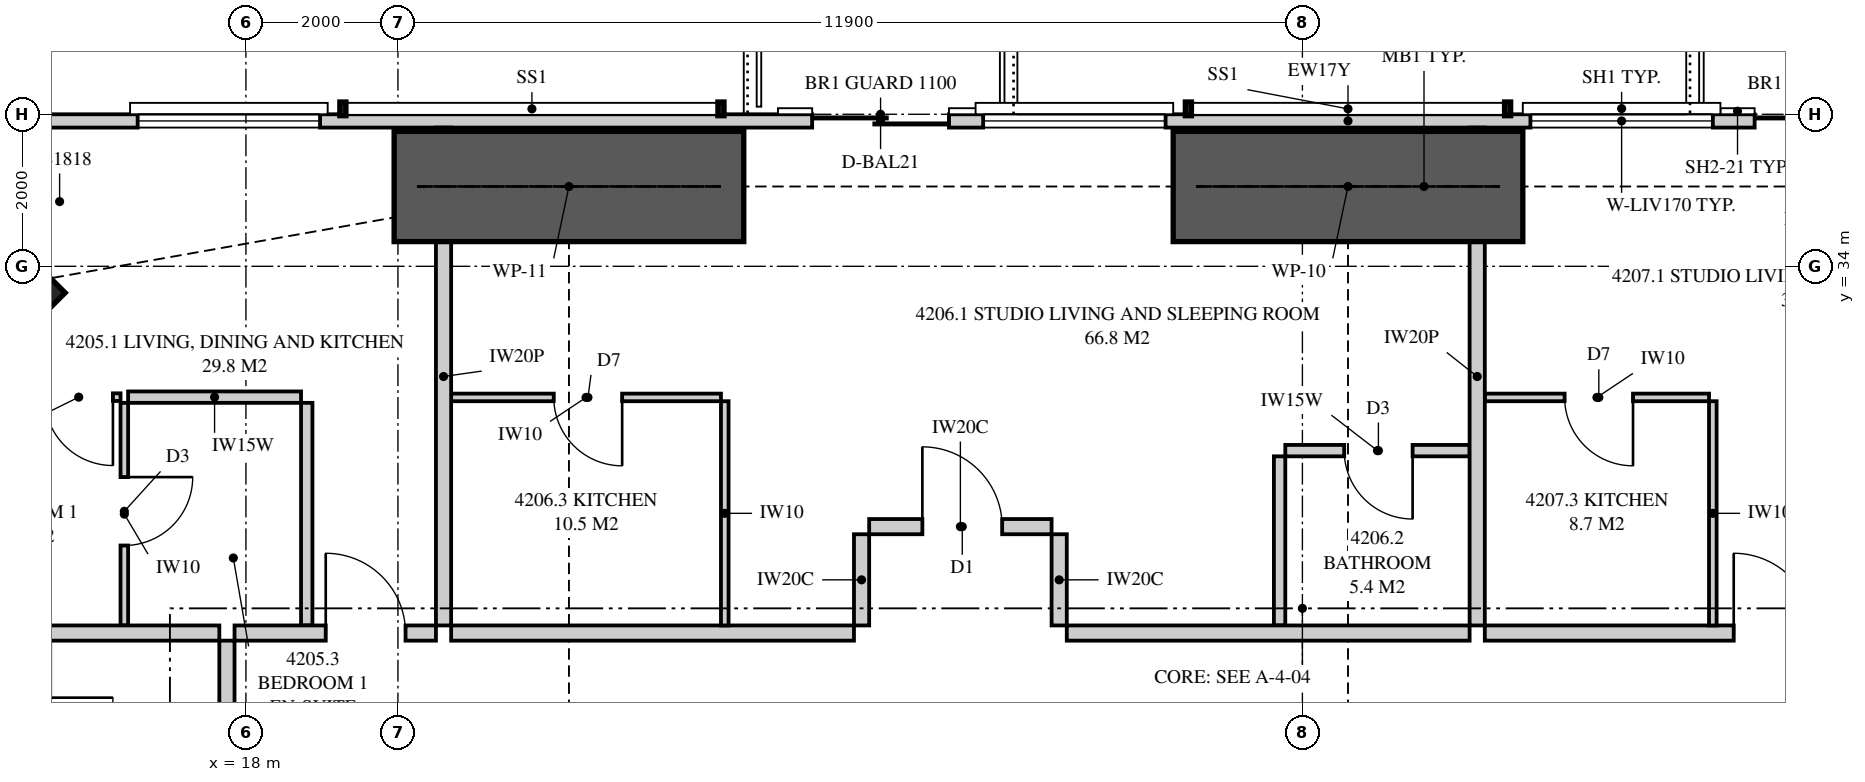
"""IFC4 building model, lengths in metres.
Left out: names, types, materials, properties, quantities, classifications, styles, units other than length and angle.
Written with IfcOpenShell. Run it as: python <this file> out.ifc"""

import sys

from ifc_helpers import new_model, si_unit, direction, frame, frame_2d, origin, origin_2d, place, context, subcontext, project, spatial, polyline, rectangle, hollow_rectangle, outline, extrude, element, fill, save


model = new_model("IFC4")
c1 = context("Model", 3, precision=1e-05, world=origin(), true_north=direction((0.0, 1.0)))
c2 = subcontext(c1, "Body", "Model", "MODEL_VIEW")
j1 = project(units=[si_unit("LENGTHUNIT", "METRE"), si_unit("PLANEANGLEUNIT", "RADIAN")], contexts=[c1])
p1 = place(None, origin())
s1 = spatial("IfcSite", under=j1, at=p1, CompositionType="ELEMENT")
p2 = place(p1, origin())
s2 = spatial("IfcBuilding", under=s1, at=p2, CompositionType="ELEMENT")
p3 = place(p2, frame((0.0, 0.0, 157.7)))
s3 = spatial("IfcBuildingStorey", under=s2, at=p3, CompositionType="ELEMENT", Elevation=157.7)
p4 = place(p3, frame((14.348, 33.652, 0.0), z_axis=(0.0, 0.0, 1.0), x_axis=(0.707106781187, -0.707106781187, 0.0)))
e1 = element("IfcColumn", 1, at=p4, inside=s3, PredefinedType="COLUMN", context=c2, shape_type="SweptSolid", body=[
    extrude(hollow_rectangle(XDim=1.8, YDim=1.8, WallThickness=0.125, at=origin_2d()), origin(), (0.0, 0.0, 1.0), 3.35),
])
p5 = place(p3, frame((49.949, 35.913, 0.0), z_axis=(0.0, 0.0, 1.0), x_axis=(-1.0, 0.0, 0.0)))
e2 = element("IfcWall", 2, at=p5, inside=s3, PredefinedType="SOLIDWALL", context=c2, shape_type="SweptSolid", body=[
    extrude(outline(polyline([(0.0, 0.0), (34.897, 0.0), (34.897, 3.11), (27.91, 3.11), (27.91, 2.15), (27.836, 2.15), (27.836, 3.11), (27.699, 3.11), (27.699, 2.15), (7.199, 2.15), (7.199, 3.11), (7.062, 3.11), (7.062, 2.15), (6.987, 2.15), (6.987, 3.11), (0.0, 3.11), (0.0, 0.0)])), frame((0.0, 0.087, 0.0), z_axis=(0.0, -1.0, 0.0), x_axis=(1.0, 0.0, 0.0)), (0.0, 0.0, 1.0), 0.175),
])
p6 = place(p5, frame((2.389, 0.0, 0.4)))
e3 = element("IfcOpeningElement", 3, at=p6, cuts=e2, PredefinedType="OPENING", context=c2, shape_type="SweptSolid", body=[
    extrude(rectangle(XDim=2.4, YDim=1.7, at=frame_2d((1.2, 0.85))), frame((0.0, 0.097, 0.0), z_axis=(0.0, -1.0, 0.0), x_axis=(1.0, 0.0, 0.0)), (0.0, 0.0, 1.0), 0.195),
])
p7 = place(p5, frame((10.299, 0.0, 0.0)))
e4 = element("IfcOpeningElement", 4, at=p7, cuts=e2, PredefinedType="OPENING", context=c2, shape_type="SweptSolid", body=[
    extrude(rectangle(XDim=1.8, YDim=2.1, at=frame_2d((0.9, 1.05))), frame((0.0, 0.097, 0.0), z_axis=(0.0, -1.0, 0.0), x_axis=(1.0, 0.0, 0.0)), (0.0, 0.0, 1.0), 0.195),
])
p8 = place(p5, frame((12.649, 0.0, 0.4)))
e5 = element("IfcOpeningElement", 5, at=p8, cuts=e2, PredefinedType="OPENING", context=c2, shape_type="SweptSolid", body=[
    extrude(rectangle(XDim=2.4, YDim=1.7, at=frame_2d((1.2, 0.85))), frame((0.0, 0.097, 0.0), z_axis=(0.0, -1.0, 0.0), x_axis=(1.0, 0.0, 0.0)), (0.0, 0.0, 1.0), 0.195),
])
p9 = place(p5, frame((22.699, 0.0, 0.0)))
e6 = element("IfcOpeningElement", 6, at=p9, cuts=e2, PredefinedType="OPENING", context=c2, shape_type="SweptSolid", body=[
    extrude(rectangle(XDim=1.8, YDim=2.1, at=frame_2d((0.9, 1.05))), frame((0.0, 0.097, 0.0), z_axis=(0.0, -1.0, 0.0), x_axis=(1.0, 0.0, 0.0)), (0.0, 0.0, 1.0), 0.195),
])
p10 = place(p5, frame((19.849, 0.0, 0.4)))
e7 = element("IfcOpeningElement", 7, at=p10, cuts=e2, PredefinedType="OPENING", context=c2, shape_type="SweptSolid", body=[
    extrude(rectangle(XDim=2.4, YDim=1.7, at=frame_2d((1.2, 0.85))), frame((0.0, 0.097, 0.0), z_axis=(0.0, -1.0, 0.0), x_axis=(1.0, 0.0, 0.0)), (0.0, 0.0, 1.0), 0.195),
])
p11 = place(p5, frame((30.973, 0.0, 0.4)))
e8 = element("IfcOpeningElement", 8, at=p11, cuts=e2, PredefinedType="OPENING", context=c2, shape_type="SweptSolid", body=[
    extrude(rectangle(XDim=2.4, YDim=1.7, at=frame_2d((1.2, 0.85))), frame((0.0, 0.097, 0.0), z_axis=(0.0, -1.0, 0.0), x_axis=(1.0, 0.0, 0.0)), (0.0, 0.0, 1.0), 0.195),
])
p12 = place(p3, frame((20.6, 35.825, 0.0), z_axis=(0.0, 0.0, 1.0), x_axis=(0.0, -1.0, 0.0)))
e9 = element("IfcWall", 9, at=p12, inside=s3, PredefinedType="PARTITIONING", context=c2, shape_type="SweptSolid", body=[
    extrude(outline(polyline([(0.143, 3.11), (0.0, 3.11), (0.0, 0.0), (0.529, 0.0), (0.529, 0.165), (1.021, 0.165), (1.021, 0.0), (6.55, 0.0), (6.55, 3.11), (1.991, 3.11), (1.991, 2.15), (1.021, 2.15), (1.021, 1.985), (0.529, 1.985), (0.529, 2.15), (0.143, 2.15), (0.143, 3.11)])), frame((0.0, 0.1, 0.0), z_axis=(0.0, -1.0, 0.0), x_axis=(1.0, 0.0, 0.0)), (0.0, 0.0, 1.0), 0.2),
])
p13 = place(p3, frame((17.85, 29.175, 0.0), z_axis=(0.0, 0.0, 1.0), x_axis=(1.0, 0.0, 0.0)))
e10 = element("IfcWall", 10, at=p13, inside=s3, PredefinedType="PARTITIONING", context=c2, shape_type="SweptSolid", body=[
    extrude(rectangle(XDim=2.65, YDim=0.2, at=frame_2d((1.325, 0.0))), origin(), (0.0, 0.0, 1.0), 3.11),
])
p14 = place(p13, frame((1.2, 0.0, 0.0)))
e11 = element("IfcOpeningElement", 11, at=p14, cuts=e10, PredefinedType="OPENING", context=c2, shape_type="SweptSolid", body=[
    extrude(rectangle(XDim=1.05, YDim=2.2, at=frame_2d((0.525, 1.1))), frame((0.0, 0.11, 0.0), z_axis=(0.0, -1.0, 0.0), x_axis=(1.0, 0.0, 0.0)), (0.0, 0.0, 1.0), 0.22),
])
p15 = place(p3, frame((16.4, 32.204, 0.0), z_axis=(0.0, 0.0, 1.0), x_axis=(0.0, -1.0, 0.0)))
e12 = element("IfcWall", 12, at=p15, inside=s3, PredefinedType="PARTITIONING", context=c2, shape_type="SweptSolid", body=[
    extrude(rectangle(XDim=2.929, YDim=0.1, at=frame_2d((1.464, 0.0))), origin(), (0.0, 0.0, 1.0), 3.11),
])
p16 = place(p15, frame((0.977, 0.0, 0.0)))
e13 = element("IfcOpeningElement", 13, at=p16, cuts=e12, PredefinedType="OPENING", context=c2, shape_type="SweptSolid", body=[
    extrude(rectangle(XDim=0.9, YDim=2.1, at=frame_2d((0.45, 1.05))), frame((0.0, 0.06, 0.0), z_axis=(0.0, -1.0, 0.0), x_axis=(1.0, 0.0, 0.0)), (0.0, 0.0, 1.0), 0.12),
])
p17 = place(p3, frame((16.35, 32.279, 0.0), z_axis=(0.0, 0.0, 1.0), x_axis=(-1.0, 0.0, 0.0)))
e14 = element("IfcWall", 14, at=p17, inside=s3, PredefinedType="PARTITIONING", context=c2, shape_type="SweptSolid", body=[
    extrude(outline(polyline([(0.0, 0.0), (4.35, 0.0), (4.35, 3.11), (3.094, 3.11), (3.094, 2.15), (1.352, 2.15), (1.352, 3.11), (0.0, 3.11), (0.0, 0.0)])), frame((0.0, 0.05, 0.0), z_axis=(0.0, -1.0, 0.0), x_axis=(1.0, 0.0, 0.0)), (0.0, 0.0, 1.0), 0.1),
])
p18 = place(p17, frame((0.1, 0.0, 0.0)))
e15 = element("IfcOpeningElement", 15, at=p18, cuts=e14, PredefinedType="OPENING", context=c2, shape_type="SweptSolid", body=[
    extrude(rectangle(XDim=0.9, YDim=2.1, at=frame_2d((0.45, 1.05))), frame((0.0, 0.06, 0.0), z_axis=(0.0, -1.0, 0.0), x_axis=(1.0, 0.0, 0.0)), (0.0, 0.0, 1.0), 0.12),
])
p19 = place(p3, frame((18.725, 32.279, 0.0), z_axis=(0.0, 0.0, 1.0), x_axis=(-1.0, 0.0, 0.0)))
e16 = element("IfcWall", 16, at=p19, inside=s3, PredefinedType="PLUMBINGWALL", context=c2, shape_type="SweptSolid", body=[
    extrude(rectangle(XDim=2.275, YDim=0.15, at=frame_2d((1.138, 0.0))), origin(), (0.0, 0.0, 1.0), 3.11),
])
p20 = place(p3, frame((18.8, 32.204, 0.0), z_axis=(0.0, 0.0, 1.0), x_axis=(0.0, -1.0, 0.0)))
e17 = element("IfcWall", 17, at=p20, inside=s3, PredefinedType="PLUMBINGWALL", context=c2, shape_type="SweptSolid", body=[
    extrude(rectangle(XDim=2.929, YDim=0.15, at=frame_2d((1.464, 0.0))), origin(), (0.0, 0.0, 1.0), 3.11),
])
p21 = place(p3, frame((34.2, 35.825, 0.0), z_axis=(0.0, 0.0, 1.0), x_axis=(0.0, -1.0, 0.0)))
e18 = element("IfcWall", 18, at=p21, inside=s3, PredefinedType="PARTITIONING", context=c2, shape_type="SweptSolid", body=[
    extrude(outline(polyline([(0.529, 2.15), (0.0, 2.15), (0.0, 0.0), (0.529, 0.0), (0.529, 0.123), (1.021, 0.123), (1.021, 0.0), (6.55, 0.0), (6.55, 3.11), (1.685, 3.11), (1.685, 2.15), (1.021, 2.15), (1.021, 2.027), (0.529, 2.027), (0.529, 2.15)])), frame((0.0, 0.1, 0.0), z_axis=(0.0, -1.0, 0.0), x_axis=(1.0, 0.0, 0.0)), (0.0, 0.0, 1.0), 0.2),
])
p22 = place(p3, frame((20.7, 29.175, 0.0), z_axis=(0.0, 0.0, 1.0), x_axis=(1.0, 0.0, 0.0)))
e19 = element("IfcWall", 19, at=p22, inside=s3, PredefinedType="PARTITIONING", context=c2, shape_type="SweptSolid", body=[
    extrude(outline(polyline([(0.0, 0.0), (5.3, 0.0), (5.3, 3.11), (1.896, 3.11), (1.896, 2.531), (1.204, 2.531), (1.204, 3.11), (0.0, 3.11), (0.0, 0.0)])), frame((0.0, 0.1, 0.0), z_axis=(0.0, -1.0, 0.0), x_axis=(1.0, 0.0, 0.0)), (0.0, 0.0, 1.0), 0.2),
])
p23 = place(p3, frame((31.675, 31.575, 0.0), z_axis=(0.0, 0.0, 1.0), x_axis=(1.0, 0.0, 0.0)))
e20 = element("IfcWall", 20, at=p23, inside=s3, PredefinedType="PLUMBINGWALL", context=c2, shape_type="SweptSolid", body=[
    extrude(outline(polyline([(0.0, 0.0), (2.425, 0.0), (2.425, 3.11), (1.146, 3.11), (1.146, 2.531), (0.504, 2.531), (0.504, 3.11), (0.0, 3.11), (0.0, 0.0)])), frame((0.0, 0.075, 0.0), z_axis=(0.0, -1.0, 0.0), x_axis=(1.0, 0.0, 0.0)), (0.0, 0.0, 1.0), 0.15),
])
p24 = place(p23, frame((0.775, 0.0, 0.0)))
e21 = element("IfcOpeningElement", 21, at=p24, cuts=e20, PredefinedType="OPENING", context=c2, shape_type="SweptSolid", body=[
    extrude(rectangle(XDim=0.9, YDim=2.1, at=frame_2d((0.45, 1.05))), frame((0.0, 0.085, 0.0), z_axis=(0.0, -1.0, 0.0), x_axis=(1.0, 0.0, 0.0)), (0.0, 0.0, 1.0), 0.17),
])
p25 = place(p3, frame((31.6, 31.5, 0.0), z_axis=(0.0, 0.0, 1.0), x_axis=(0.0, -1.0, 0.0)))
e22 = element("IfcWall", 22, at=p25, inside=s3, PredefinedType="PLUMBINGWALL", context=c2, shape_type="SweptSolid", body=[
    extrude(rectangle(XDim=2.225, YDim=0.15, at=frame_2d((1.113, 0.0))), origin(), (0.0, 0.0, 1.0), 3.11),
])
p26 = place(p3, frame((20.7, 32.275, 0.0), z_axis=(0.0, 0.0, 1.0), x_axis=(1.0, 0.0, 0.0)))
e23 = element("IfcWall", 23, at=p26, inside=s3, PredefinedType="PARTITIONING", context=c2, shape_type="SweptSolid", body=[
    extrude(outline(polyline([(0.0, 0.0), (3.55, 0.0), (3.55, 3.11), (1.846, 3.11), (1.846, 2.531), (1.254, 2.531), (1.254, 3.11), (0.0, 3.11), (0.0, 0.0)])), frame((0.0, 0.05, 0.0), z_axis=(0.0, -1.0, 0.0), x_axis=(1.0, 0.0, 0.0)), (0.0, 0.0, 1.0), 0.1),
])
p27 = place(p26, frame((1.35, 0.0, 0.0)))
e24 = element("IfcOpeningElement", 24, at=p27, cuts=e23, PredefinedType="OPENING", context=c2, shape_type="SweptSolid", body=[
    extrude(rectangle(XDim=0.9, YDim=2.1, at=frame_2d((0.45, 1.05))), frame((0.0, 0.06, 0.0), z_axis=(0.0, -1.0, 0.0), x_axis=(1.0, 0.0, 0.0)), (0.0, 0.0, 1.0), 0.12),
])
p28 = place(p3, frame((24.3, 32.225, 0.0), z_axis=(0.0, 0.0, 1.0), x_axis=(0.0, -1.0, 0.0)))
e25 = element("IfcWall", 25, at=p28, inside=s3, PredefinedType="PARTITIONING", context=c2, shape_type="SweptSolid", body=[
    extrude(rectangle(XDim=2.95, YDim=0.1, at=frame_2d((1.475, 0.0))), origin(), (0.0, 0.0, 1.0), 3.11),
])
p29 = place(p3, frame((34.3, 29.175, 0.0), z_axis=(0.0, 0.0, 1.0), x_axis=(1.0, 0.0, 0.0)))
e26 = element("IfcWall", 26, at=p29, inside=s3, PredefinedType="PARTITIONING", context=c2, shape_type="SweptSolid", body=[
    extrude(rectangle(XDim=7.55, YDim=0.2, at=frame_2d((3.775, 0.0))), origin(), (0.0, 0.0, 1.0), 3.11),
])
p30 = place(p29, frame((3.275, 0.0, 0.0)))
e27 = element("IfcOpeningElement", 27, at=p30, cuts=e26, PredefinedType="OPENING", context=c2, shape_type="SweptSolid", body=[
    extrude(rectangle(XDim=1.05, YDim=2.2, at=frame_2d((0.525, 1.1))), frame((0.0, 0.11, 0.0), z_axis=(0.0, -1.0, 0.0), x_axis=(1.0, 0.0, 0.0)), (0.0, 0.0, 1.0), 0.22),
])
p31 = place(p3, frame((34.3, 32.275, 0.0), z_axis=(0.0, 0.0, 1.0), x_axis=(1.0, 0.0, 0.0)))
e28 = element("IfcWall", 28, at=p31, inside=s3, PredefinedType="PARTITIONING", context=c2, shape_type="SweptSolid", body=[
    extrude(rectangle(XDim=2.95, YDim=0.1, at=frame_2d((1.475, 0.0))), origin(), (0.0, 0.0, 1.0), 3.11),
])
p32 = place(p31, frame((1.05, 0.0, 0.0)))
e29 = element("IfcOpeningElement", 29, at=p32, cuts=e28, PredefinedType="OPENING", context=c2, shape_type="SweptSolid", body=[
    extrude(rectangle(XDim=0.9, YDim=2.1, at=frame_2d((0.45, 1.05))), frame((0.0, 0.06, 0.0), z_axis=(0.0, -1.0, 0.0), x_axis=(1.0, 0.0, 0.0)), (0.0, 0.0, 1.0), 0.12),
])
p33 = place(p3, frame((37.3, 32.225, 0.0), z_axis=(0.0, 0.0, 1.0), x_axis=(0.0, -1.0, 0.0)))
e30 = element("IfcWall", 30, at=p33, inside=s3, PredefinedType="PARTITIONING", context=c2, shape_type="SweptSolid", body=[
    extrude(rectangle(XDim=2.95, YDim=0.1, at=frame_2d((1.475, 0.0))), origin(), (0.0, 0.0, 1.0), 3.11),
])
p34 = place(p3, frame((12.0, 29.175, 0.0), z_axis=(0.0, 0.0, 1.0), x_axis=(1.0, 0.0, 0.0)))
e31 = element("IfcWall", 31, at=p34, inside=s3, PredefinedType="PARTITIONING", context=c2, shape_type="SweptSolid", body=[
    extrude(outline(polyline([(0.0, 0.0), (5.65, 0.0), (5.65, 3.11), (2.547, 3.11), (2.547, 2.15), (0.703, 2.15), (0.703, 3.11), (0.0, 3.11), (0.0, 0.0)])), frame((0.0, 0.1, 0.0), z_axis=(0.0, -1.0, 0.0), x_axis=(1.0, 0.0, 0.0)), (0.0, 0.0, 1.0), 0.2),
])
p35 = place(p3, frame((28.8, 29.175, 0.0), z_axis=(0.0, 0.0, 1.0), x_axis=(1.0, 0.0, 0.0)))
e32 = element("IfcWall", 32, at=p35, inside=s3, PredefinedType="PARTITIONING", context=c2, shape_type="SweptSolid", body=[
    extrude(outline(polyline([(0.0, 0.0), (5.3, 0.0), (5.3, 3.11), (4.046, 3.11), (4.046, 2.531), (3.354, 2.531), (3.354, 3.11), (0.0, 3.11), (0.0, 0.0)])), frame((0.0, 0.1, 0.0), z_axis=(0.0, -1.0, 0.0), x_axis=(1.0, 0.0, 0.0)), (0.0, 0.0, 1.0), 0.2),
])
p36 = place(p3, frame((26.2, 30.575, 0.0), z_axis=(0.0, 0.0, 1.0), x_axis=(1.0, 0.0, 0.0)))
e33 = element("IfcWall", 33, at=p36, inside=s3, PredefinedType="PARTITIONING", context=c2, shape_type="SweptSolid", body=[
    extrude(rectangle(XDim=2.4, YDim=0.2, at=frame_2d((1.2, 0.0))), origin(), (0.0, 0.0, 1.0), 3.11),
])
p37 = place(p36, frame((0.7, 0.0, 0.0)))
e34 = element("IfcOpeningElement", 34, at=p37, cuts=e33, PredefinedType="OPENING", context=c2, shape_type="SweptSolid", body=[
    extrude(rectangle(XDim=1.05, YDim=2.2, at=frame_2d((0.525, 1.1))), frame((0.0, 0.11, 0.0), z_axis=(0.0, -1.0, 0.0), x_axis=(1.0, 0.0, 0.0)), (0.0, 0.0, 1.0), 0.22),
])
for number, where, z_axis, x_axis in (
    (35, (26.1, 29.275, 0.0), (0.0, 0.0, 1.0), (0.0, 1.0, 0.0)),
    (36, (28.7, 29.275, 0.0), (0.0, 0.0, 1.0), (0.0, 1.0, 0.0)),
):
    element("IfcWall", number, at=place(p3, frame(where, z_axis=z_axis, x_axis=x_axis)), inside=s3, PredefinedType="PARTITIONING", context=c2, shape_type="SweptSolid", body=[
        extrude(rectangle(XDim=1.2, YDim=0.2, at=frame_2d((0.6, 0.0))), origin(), (0.0, 0.0, 1.0), 3.11),
    ])
p38 = place(p3, frame((17.75, 24.6, 0.0), z_axis=(0.0, 0.0, 1.0), x_axis=(0.0, 1.0, 0.0)))
e37 = element("IfcWall", 37, at=p38, inside=s3, PredefinedType="PARTITIONING", context=c2, shape_type="SweptSolid", body=[
    extrude(outline(polyline([(0.0, 0.0), (4.475, 0.0), (4.475, 3.11), (0.746, 3.11), (0.746, 2.531), (0.054, 2.531), (0.054, 3.11), (0.0, 3.11), (0.0, 0.0)])), frame((0.0, 0.1, 0.0), z_axis=(0.0, -1.0, 0.0), x_axis=(1.0, 0.0, 0.0)), (0.0, 0.0, 1.0), 0.2),
])
for number, where, z_axis, x_axis in (
    (38, (30.2, 35.05, 0.0), (0.0, 0.0, 1.0), (1.0, 0.0, 0.0)),
    (39, (19.95, 35.05, 0.0), (0.0, 0.0, 1.0), (1.0, 0.0, 0.0)),
):
    element("IfcWall", number, at=place(p3, frame(where, z_axis=z_axis, x_axis=x_axis)), inside=s3, PredefinedType="SHEAR", context=c2, shape_type="SweptSolid", body=[
        extrude(rectangle(XDim=4.6, YDim=1.45, at=frame_2d((2.3, 0.0))), origin(), (0.0, 0.0, 1.0), 3.35),
    ])
p39 = place(p7, origin())
e40 = element("IfcDoor", 40, at=p39, inside=s3, OperationType="SLIDING_TO_LEFT", PredefinedType="DOOR", context=c2, shape_type="SweptSolid", body=[
    extrude(rectangle(XDim=1.8, YDim=2.1, at=frame_2d((0.9, 1.05))), frame((0.0, 0.025, 0.0), z_axis=(0.0, -1.0, 0.0), x_axis=(1.0, 0.0, 0.0)), (0.0, 0.0, 1.0), 0.05),
])
fill(e4, e40)
p40 = place(p8, origin())
e41 = element("IfcWindow", 41, at=p40, inside=s3, PartitioningType="SINGLE_PANEL", PredefinedType="WINDOW", context=c2, shape_type="SweptSolid", body=[
    extrude(rectangle(XDim=2.4, YDim=1.7, at=frame_2d((1.2, 0.85))), frame((0.0, 0.03, 0.0), z_axis=(0.0, -1.0, 0.0), x_axis=(1.0, 0.0, 0.0)), (0.0, 0.0, 1.0), 0.06),
])
fill(e5, e41)
p41 = place(p9, origin())
e42 = element("IfcDoor", 42, at=p41, inside=s3, OperationType="SLIDING_TO_LEFT", PredefinedType="DOOR", context=c2, shape_type="SweptSolid", body=[
    extrude(rectangle(XDim=1.8, YDim=2.1, at=frame_2d((0.9, 1.05))), frame((0.0, 0.025, 0.0), z_axis=(0.0, -1.0, 0.0), x_axis=(1.0, 0.0, 0.0)), (0.0, 0.0, 1.0), 0.05),
])
fill(e6, e42)
p42 = place(p10, origin())
e43 = element("IfcWindow", 43, at=p42, inside=s3, PartitioningType="SINGLE_PANEL", PredefinedType="WINDOW", context=c2, shape_type="SweptSolid", body=[
    extrude(rectangle(XDim=2.4, YDim=1.7, at=frame_2d((1.2, 0.85))), frame((0.0, 0.03, 0.0), z_axis=(0.0, -1.0, 0.0), x_axis=(1.0, 0.0, 0.0)), (0.0, 0.0, 1.0), 0.06),
])
fill(e7, e43)
p43 = place(p11, origin())
e44 = element("IfcWindow", 44, at=p43, inside=s3, PartitioningType="SINGLE_PANEL", PredefinedType="WINDOW", context=c2, shape_type="SweptSolid", body=[
    extrude(rectangle(XDim=2.4, YDim=1.7, at=frame_2d((1.2, 0.85))), frame((0.0, 0.03, 0.0), z_axis=(0.0, -1.0, 0.0), x_axis=(1.0, 0.0, 0.0)), (0.0, 0.0, 1.0), 0.06),
])
fill(e8, e44)
p44 = place(p14, origin())
e45 = element("IfcDoor", 45, at=p44, inside=s3, OperationType="SINGLE_SWING_LEFT", PredefinedType="DOOR", context=c2, shape_type="SweptSolid", body=[
    extrude(rectangle(XDim=1.05, YDim=2.2, at=frame_2d((0.525, 1.1))), frame((0.0, 0.025, 0.0), z_axis=(0.0, -1.0, 0.0), x_axis=(1.0, 0.0, 0.0)), (0.0, 0.0, 1.0), 0.05),
])
fill(e11, e45)
p45 = place(p18, origin())
e46 = element("IfcDoor", 46, at=p45, inside=s3, OperationType="SINGLE_SWING_LEFT", PredefinedType="DOOR", context=c2, shape_type="SweptSolid", body=[
    extrude(rectangle(XDim=0.9, YDim=2.1, at=frame_2d((0.45, 1.05))), frame((0.0, 0.025, 0.0), z_axis=(0.0, -1.0, 0.0), x_axis=(1.0, 0.0, 0.0)), (0.0, 0.0, 1.0), 0.05),
])
fill(e15, e46)
p46 = place(p16, origin())
e47 = element("IfcDoor", 47, at=p46, inside=s3, OperationType="SINGLE_SWING_LEFT", PredefinedType="DOOR", context=c2, shape_type="SweptSolid", body=[
    extrude(rectangle(XDim=0.9, YDim=2.1, at=frame_2d((0.45, 1.05))), frame((0.0, 0.025, 0.0), z_axis=(0.0, -1.0, 0.0), x_axis=(1.0, 0.0, 0.0)), (0.0, 0.0, 1.0), 0.05),
])
fill(e13, e47)
p47 = place(p37, origin())
e48 = element("IfcDoor", 48, at=p47, inside=s3, OperationType="SINGLE_SWING_LEFT", PredefinedType="DOOR", context=c2, shape_type="SweptSolid", body=[
    extrude(rectangle(XDim=1.05, YDim=2.2, at=frame_2d((0.525, 1.1))), frame((0.0, 0.025, 0.0), z_axis=(0.0, -1.0, 0.0), x_axis=(1.0, 0.0, 0.0)), (0.0, 0.0, 1.0), 0.05),
])
fill(e34, e48)
p48 = place(p24, frame((0.9, 0.0, 0.0), z_axis=(0.0, 0.0, 1.0), x_axis=(-1.0, 0.0, 0.0)))
e49 = element("IfcDoor", 49, at=p48, inside=s3, OperationType="SINGLE_SWING_LEFT", PredefinedType="DOOR", context=c2, shape_type="SweptSolid", body=[
    extrude(rectangle(XDim=0.9, YDim=2.1, at=frame_2d((0.45, 1.05))), frame((0.0, 0.025, 0.0), z_axis=(0.0, -1.0, 0.0), x_axis=(1.0, 0.0, 0.0)), (0.0, 0.0, 1.0), 0.05),
])
fill(e21, e49)
p49 = place(p27, frame((0.9, 0.0, 0.0), z_axis=(0.0, 0.0, 1.0), x_axis=(-1.0, 0.0, 0.0)))
e50 = element("IfcDoor", 50, at=p49, inside=s3, OperationType="SINGLE_SWING_LEFT", PredefinedType="DOOR", context=c2, shape_type="SweptSolid", body=[
    extrude(rectangle(XDim=0.9, YDim=2.1, at=frame_2d((0.45, 1.05))), frame((0.0, 0.025, 0.0), z_axis=(0.0, -1.0, 0.0), x_axis=(1.0, 0.0, 0.0)), (0.0, 0.0, 1.0), 0.05),
])
fill(e24, e50)
p50 = place(p30, origin())
e51 = element("IfcDoor", 51, at=p50, inside=s3, OperationType="SINGLE_SWING_LEFT", PredefinedType="DOOR", context=c2, shape_type="SweptSolid", body=[
    extrude(rectangle(XDim=1.05, YDim=2.2, at=frame_2d((0.525, 1.1))), frame((0.0, 0.025, 0.0), z_axis=(0.0, -1.0, 0.0), x_axis=(1.0, 0.0, 0.0)), (0.0, 0.0, 1.0), 0.05),
])
fill(e27, e51)
p51 = place(p32, frame((0.9, 0.0, 0.0), z_axis=(0.0, 0.0, 1.0), x_axis=(-1.0, 0.0, 0.0)))
e52 = element("IfcDoor", 52, at=p51, inside=s3, OperationType="SINGLE_SWING_LEFT", PredefinedType="DOOR", context=c2, shape_type="SweptSolid", body=[
    extrude(rectangle(XDim=0.9, YDim=2.1, at=frame_2d((0.45, 1.05))), frame((0.0, 0.025, 0.0), z_axis=(0.0, -1.0, 0.0), x_axis=(1.0, 0.0, 0.0)), (0.0, 0.0, 1.0), 0.05),
])
fill(e29, e52)
save(model, sys.argv[1])
